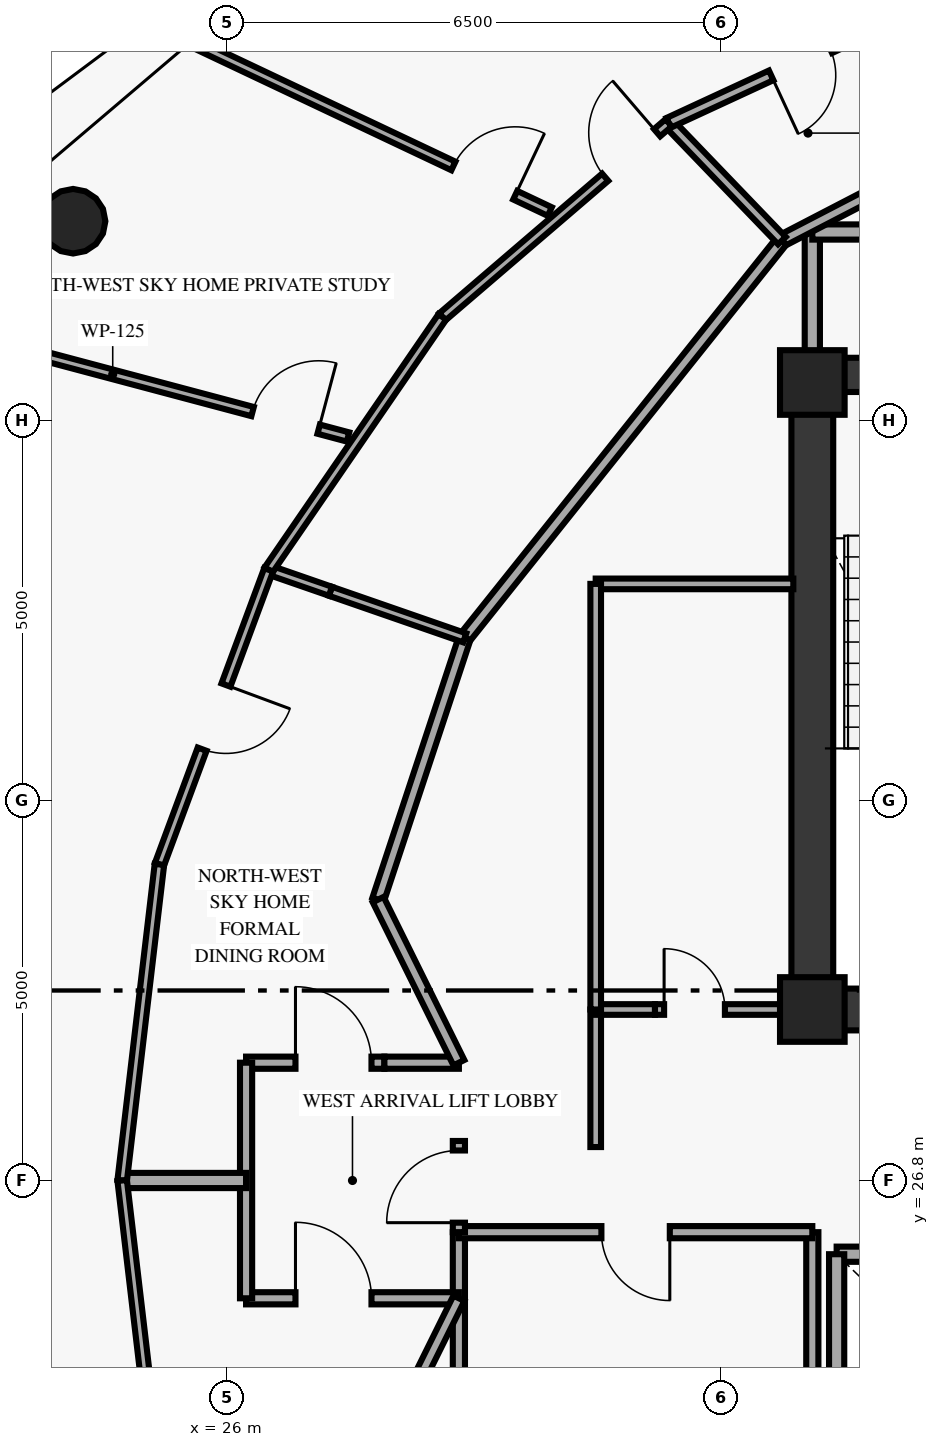
"""IFC4 building model, lengths in metres.
Left out: names, types, materials, properties, quantities, classifications, styles, units other than length and angle.
Written with IfcOpenShell. Run it as: python <this file> out.ifc"""

import sys

from ifc_helpers import new_model, si_unit, direction, frame, frame_2d, origin, origin_2d, place, context, subcontext, project, spatial, rectangle, circle, extrude, element, fill, save


model = new_model("IFC4")
c1 = context("Model", 3, precision=1e-05, world=origin(), true_north=direction((0.0, 1.0)))
c2 = subcontext(c1, "Body", "Model", "MODEL_VIEW")
j1 = project(units=[si_unit("LENGTHUNIT", "METRE"), si_unit("PLANEANGLEUNIT", "RADIAN")], contexts=[c1])
p1 = place(None, origin())
s1 = spatial("IfcSite", under=j1, at=p1, CompositionType="ELEMENT")
p2 = place(p1, origin())
s2 = spatial("IfcBuilding", under=s1, at=p2, CompositionType="ELEMENT")
p3 = place(p2, frame((0.0, 0.0, 251.95)))
s3 = spatial("IfcBuildingStorey", under=s2, at=p3, CompositionType="ELEMENT", Elevation=251.95)
for number, where, z_axis, x_axis in (
    (1, (33.7, 37.3, 0.0), (0.0, 0.0, 1.0), (1.0, 0.0, 0.0)),
    (2, (33.7, 29.05, 0.0), (0.0, 0.0, 1.0), (1.0, 0.0, 0.0)),
):
    element("IfcColumn", number, at=place(p3, frame(where, z_axis=z_axis, x_axis=x_axis)), inside=s3, PredefinedType="PILASTER", context=c2, shape_type="SweptSolid", body=[
        extrude(rectangle(XDim=0.85, YDim=0.85, at=origin_2d()), origin(), (0.0, 0.0, 1.0), 3.39),
    ])
p4 = place(p3, frame((23.974, 39.422, 0.0), z_axis=(0.0, 0.0, 1.0), x_axis=(1.0, 0.0, 0.0)))
e3 = element("IfcColumn", 3, at=p4, inside=s3, PredefinedType="COLUMN", context=c2, shape_type="SweptSolid", body=[
    extrude(circle(Radius=0.425, at=origin_2d()), origin(), (0.0, 0.0, 1.0), 3.39),
])
p5 = place(p3, frame((33.7, 29.05, 0.0), z_axis=(0.0, 0.0, 1.0), x_axis=(0.0, 1.0, 0.0)))
e4 = element("IfcWall", 4, at=p5, inside=s3, PredefinedType="SHEAR", context=c2, shape_type="SweptSolid", body=[
    extrude(rectangle(XDim=8.35, YDim=0.55, at=frame_2d((4.175, 0.0))), origin(), (0.0, 0.0, 1.0), 3.39),
])
p6 = place(p3, frame((33.7, 29.05, 0.0), z_axis=(0.0, 0.0, 1.0), x_axis=(1.0, 0.0, 0.0)))
e5 = element("IfcWall", 5, at=p6, inside=s3, PredefinedType="SHEAR", context=c2, shape_type="SweptSolid", body=[
    extrude(rectangle(XDim=10.6, YDim=0.55, at=frame_2d((5.3, 0.0))), origin(), (0.0, 0.0, 1.0), 3.39),
])
p7 = place(p3, frame((37.35, 37.4, 0.0), z_axis=(0.0, 0.0, 1.0), x_axis=(-1.0, 0.0, 0.0)))
e6 = element("IfcWall", 6, at=p7, inside=s3, PredefinedType="SHEAR", context=c2, shape_type="SweptSolid", body=[
    extrude(rectangle(XDim=3.65, YDim=0.45, at=frame_2d((1.825, 0.0))), origin(), (0.0, 0.0, 1.0), 3.39),
])
p8 = place(p7, frame((1.25, 0.0, 0.0)))
e7 = element("IfcOpeningElement", 7, at=p8, cuts=e6, PredefinedType="OPENING", context=c2, shape_type="SweptSolid", body=[
    extrude(rectangle(XDim=1.15, YDim=2.15, at=frame_2d((0.575, 1.075))), frame((0.0, 0.235, 0.0), z_axis=(0.0, -1.0, 0.0), x_axis=(1.0, 0.0, 0.0)), (0.0, 0.0, 1.0), 0.47),
])
p9 = place(p3, frame((33.7, 37.4, 0.0), z_axis=(0.0, 0.0, 1.0), x_axis=(0.0, 1.0, 0.0)))
e8 = element("IfcWall", 8, at=p9, inside=s3, PredefinedType="SOLIDWALL", context=c2, shape_type="SweptSolid", body=[
    extrude(rectangle(XDim=1.88, YDim=0.2, at=frame_2d((0.94, 0.0))), origin(), (0.0, 0.0, 1.0), 3.39),
])
p10 = place(p3, frame((38.9, 39.28, 0.0), z_axis=(0.0, 0.0, 1.0), x_axis=(-1.0, 0.0, 0.0)))
e9 = element("IfcWall", 9, at=p10, inside=s3, PredefinedType="SOLIDWALL", context=c2, shape_type="SweptSolid", body=[
    extrude(rectangle(XDim=5.2, YDim=0.2, at=frame_2d((2.6, 0.0))), origin(), (0.0, 0.0, 1.0), 3.39),
])
p11 = place(p10, frame((1.816, 0.0, 0.0)))
e10 = element("IfcOpeningElement", 10, at=p11, cuts=e9, PredefinedType="OPENING", context=c2, shape_type="SweptSolid", body=[
    extrude(rectangle(XDim=1.0, YDim=2.02, at=frame_2d((0.5, 1.01))), frame((0.0, 0.11, 0.0), z_axis=(0.0, -1.0, 0.0), x_axis=(1.0, 0.0, 0.0)), (0.0, 0.0, 1.0), 0.22),
])
p12 = place(p3, frame((34.02, 25.83, 0.0), z_axis=(0.0, 0.0, 1.0), x_axis=(1.0, 0.0, 0.0)))
e11 = element("IfcWall", 11, at=p12, inside=s3, PredefinedType="SOLIDWALL", context=c2, shape_type="SweptSolid", body=[
    extrude(rectangle(XDim=2.5, YDim=0.2, at=frame_2d((1.25, 0.0))), origin(), (0.0, 0.0, 1.0), 3.39),
])
p13 = place(p3, frame((34.02, 23.42, 0.0), z_axis=(0.0, 0.0, 1.0), x_axis=(0.0, 1.0, 0.0)))
e12 = element("IfcWall", 12, at=p13, inside=s3, PredefinedType="SOLIDWALL", context=c2, shape_type="SweptSolid", body=[
    extrude(rectangle(XDim=2.41, YDim=0.2, at=frame_2d((1.205, 0.0))), origin(), (0.0, 0.0, 1.0), 3.39),
])
p14 = place(p3, frame((29.05, 19.05, 0.0), z_axis=(0.0, 0.0, 1.0), x_axis=(0.0, 1.0, 0.0)))
e13 = element("IfcWall", 13, at=p14, inside=s3, PredefinedType="PARTITIONING", context=c2, shape_type="SweptSolid", body=[
    extrude(rectangle(XDim=7.07, YDim=0.16, at=frame_2d((3.535, 0.0))), origin(), (0.0, 0.0, 1.0), 3.39),
])
p15 = place(p3, frame((33.7, 23.45, 0.0), z_axis=(0.0, 0.0, 1.0), x_axis=(0.0, 1.0, 0.0)))
e14 = element("IfcWall", 14, at=p15, inside=s3, PredefinedType="PARTITIONING", context=c2, shape_type="SweptSolid", body=[
    extrude(rectangle(XDim=2.67, YDim=0.16, at=frame_2d((1.335, 0.0))), origin(), (0.0, 0.0, 1.0), 2.775),
])
p16 = place(p3, frame((33.7, 26.12, 0.0), z_axis=(0.0, 0.0, 1.0), x_axis=(-1.0, 0.0, 0.0)))
e15 = element("IfcWall", 15, at=p16, inside=s3, PredefinedType="PARTITIONING", context=c2, shape_type="SweptSolid", body=[
    extrude(rectangle(XDim=4.65, YDim=0.16, at=frame_2d((2.325, 0.0))), origin(), (0.0, 0.0, 1.0), 3.39),
])
p17 = place(p16, frame((1.875, 0.0, 0.0)))
e16 = element("IfcOpeningElement", 16, at=p17, cuts=e15, PredefinedType="OPENING", context=c2, shape_type="SweptSolid", body=[
    extrude(rectangle(XDim=0.9, YDim=2.02, at=frame_2d((0.45, 1.01))), frame((0.0, 0.09, 0.0), z_axis=(0.0, -1.0, 0.0), x_axis=(1.0, 0.0, 0.0)), (0.0, 0.0, 1.0), 0.18),
])
p18 = place(p3, frame((29.05, 26.12, 0.0), z_axis=(0.0, 0.0, 1.0), x_axis=(0.0, 1.0, 0.0)))
e17 = element("IfcWall", 17, at=p18, inside=s3, PredefinedType="PARTITIONING", context=c2, shape_type="SweptSolid", body=[
    extrude(rectangle(XDim=1.2, YDim=0.16, at=frame_2d((0.6, 0.0))), origin(), (0.0, 0.0, 1.0), 3.39),
])
p19 = place(p18, frame((0.125, 0.0, 0.0)))
e18 = element("IfcOpeningElement", 18, at=p19, cuts=e17, PredefinedType="OPENING", context=c2, shape_type="SweptSolid", body=[
    extrude(rectangle(XDim=0.95, YDim=2.15, at=frame_2d((0.475, 1.075))), frame((0.0, 0.09, 0.0), z_axis=(0.0, -1.0, 0.0), x_axis=(1.0, 0.0, 0.0)), (0.0, 0.0, 1.0), 0.18),
])
p20 = place(p3, frame((30.85, 27.24, 0.0), z_axis=(0.0, 0.0, 1.0), x_axis=(0.0, 1.0, 0.0)))
e19 = element("IfcWall", 19, at=p20, inside=s3, PredefinedType="PARTITIONING", context=c2, shape_type="SweptSolid", body=[
    extrude(rectangle(XDim=1.81, YDim=0.14, at=frame_2d((0.905, 0.0))), origin(), (0.0, 0.0, 1.0), 3.39),
])
p21 = place(p3, frame((30.85, 29.05, 0.0), z_axis=(0.0, 0.0, 1.0), x_axis=(1.0, 0.0, 0.0)))
e20 = element("IfcWall", 20, at=p21, inside=s3, PredefinedType="PARTITIONING", context=c2, shape_type="SweptSolid", body=[
    extrude(rectangle(XDim=0.78, YDim=0.14, at=frame_2d((0.39, 0.0))), origin(), (0.0, 0.0, 1.0), 3.39),
])
p22 = place(p3, frame((31.63, 29.05, 0.0), z_axis=(0.0, 0.0, 1.0), x_axis=(1.0, 0.0, 0.0)))
e21 = element("IfcWall", 21, at=p22, inside=s3, PredefinedType="PARTITIONING", context=c2, shape_type="SweptSolid", body=[
    extrude(rectangle(XDim=1.82, YDim=0.14, at=frame_2d((0.91, 0.0))), origin(), (0.0, 0.0, 1.0), 2.53),
])
p23 = place(p22, frame((0.12, 0.0, 0.0)))
e22 = element("IfcOpeningElement", 22, at=p23, cuts=e21, PredefinedType="OPENING", context=c2, shape_type="SweptSolid", body=[
    extrude(rectangle(XDim=0.8, YDim=2.05, at=frame_2d((0.4, 1.025))), frame((0.0, 0.08, 0.0), z_axis=(0.0, -1.0, 0.0), x_axis=(1.0, 0.0, 0.0)), (0.0, 0.0, 1.0), 0.16),
])
p24 = place(p3, frame((30.85, 34.65, 0.0), z_axis=(0.0, 0.0, 1.0), x_axis=(1.0, 0.0, 0.0)))
e23 = element("IfcWall", 23, at=p24, inside=s3, PredefinedType="PARTITIONING", context=c2, shape_type="SweptSolid", body=[
    extrude(rectangle(XDim=2.6, YDim=0.14, at=frame_2d((1.3, 0.0))), origin(), (0.0, 0.0, 1.0), 3.39),
])
p25 = place(p3, frame((30.85, 29.05, 0.0), z_axis=(0.0, 0.0, 1.0), x_axis=(0.0, 1.0, 0.0)))
e24 = element("IfcWall", 24, at=p25, inside=s3, PredefinedType="PARTITIONING", context=c2, shape_type="SweptSolid", body=[
    extrude(rectangle(XDim=5.6, YDim=0.14, at=frame_2d((2.8, 0.0))), origin(), (0.0, 0.0, 1.0), 3.39),
])
p26 = place(p3, frame((36.049, 40.593, 0.0), z_axis=(0.0, 0.0, 1.0), x_axis=(-0.887674575788, -0.460471331898, 0.0)))
e25 = element("IfcWall", 25, at=p26, inside=s3, PredefinedType="PARTITIONING", context=c2, shape_type="SweptSolid", body=[
    extrude(rectangle(XDim=3.097, YDim=0.16, at=frame_2d((1.548, 0.0))), origin(), (0.0, 0.0, 1.0), 3.39),
])
p27 = place(p3, frame((33.3, 39.167, 0.0), z_axis=(0.0, 0.0, 1.0), x_axis=(-0.623915746766, -0.781491612839, 0.0)))
e26 = element("IfcWall", 26, at=p27, inside=s3, PredefinedType="PARTITIONING", context=c2, shape_type="SweptSolid", body=[
    extrude(rectangle(XDim=6.688, YDim=0.16, at=frame_2d((3.344, 0.0))), origin(), (0.0, 0.0, 1.0), 3.39),
])
p28 = place(p3, frame((29.127, 33.94, 0.0), z_axis=(0.0, 0.0, 1.0), x_axis=(-0.313985571683, -0.949427754374, 0.0)))
e27 = element("IfcWall", 27, at=p28, inside=s3, PredefinedType="PARTITIONING", context=c2, shape_type="SweptSolid", body=[
    extrude(rectangle(XDim=3.627, YDim=0.16, at=frame_2d((1.813, 0.0))), origin(), (0.0, 0.0, 1.0), 3.39),
])
p29 = place(p3, frame((26.25, 28.35, 0.0), z_axis=(0.0, 0.0, 1.0), x_axis=(1.0, 0.0, 0.0)))
e28 = element("IfcWall", 28, at=p29, inside=s3, PredefinedType="PARTITIONING", context=c2, shape_type="SweptSolid", body=[
    extrude(rectangle(XDim=1.82, YDim=0.16, at=frame_2d((0.91, 0.0))), origin(), (0.0, 0.0, 1.0), 3.39),
])
p30 = place(p29, frame((0.65, 0.0, 0.0)))
e29 = element("IfcOpeningElement", 29, at=p30, cuts=e28, PredefinedType="OPENING", context=c2, shape_type="SweptSolid", body=[
    extrude(rectangle(XDim=1.0, YDim=2.02, at=frame_2d((0.5, 1.01))), frame((0.0, 0.09, 0.0), z_axis=(0.0, -1.0, 0.0), x_axis=(1.0, 0.0, 0.0)), (0.0, 0.0, 1.0), 0.18),
])
p31 = place(p3, frame((28.07, 28.35, 0.0), z_axis=(0.0, 0.0, 1.0), x_axis=(1.0, 0.0, 0.0)))
e30 = element("IfcWall", 30, at=p31, inside=s3, PredefinedType="PARTITIONING", context=c2, shape_type="SweptSolid", body=[
    extrude(rectangle(XDim=0.98, YDim=0.16, at=frame_2d((0.49, 0.0))), origin(), (0.0, 0.0, 1.0), 2.53),
])
p32 = place(p3, frame((26.25, 25.25, 0.0), z_axis=(0.0, 0.0, 1.0), x_axis=(1.0, 0.0, 0.0)))
e31 = element("IfcWall", 31, at=p32, inside=s3, PredefinedType="PARTITIONING", context=c2, shape_type="SweptSolid", body=[
    extrude(rectangle(XDim=2.8, YDim=0.16, at=frame_2d((1.4, 0.0))), origin(), (0.0, 0.0, 1.0), 3.39),
])
p33 = place(p32, frame((0.65, 0.0, 0.0)))
e32 = element("IfcOpeningElement", 32, at=p33, cuts=e31, PredefinedType="OPENING", context=c2, shape_type="SweptSolid", body=[
    extrude(rectangle(XDim=1.0, YDim=2.02, at=frame_2d((0.5, 1.01))), frame((0.0, 0.09, 0.0), z_axis=(0.0, -1.0, 0.0), x_axis=(1.0, 0.0, 0.0)), (0.0, 0.0, 1.0), 0.18),
])
p34 = place(p3, frame((26.25, 25.25, 0.0), z_axis=(0.0, 0.0, 1.0), x_axis=(0.0, 1.0, 0.0)))
e33 = element("IfcWall", 33, at=p34, inside=s3, PredefinedType="PARTITIONING", context=c2, shape_type="SweptSolid", body=[
    extrude(rectangle(XDim=3.1, YDim=0.16, at=frame_2d((1.55, 0.0))), origin(), (0.0, 0.0, 1.0), 3.39),
])
for number, where, z_axis, x_axis in (
    (34, (27.988, 30.496, 0.0), (0.0, 0.0, 1.0), (0.444, -0.896, 0.0)),
    (35, (27.988, 23.104, 0.0), (0.0, 0.0, 1.0), (0.444, 0.896, 0.0)),
):
    element("IfcWall", number, at=place(p3, frame(where, z_axis=z_axis, x_axis=x_axis)), inside=s3, PredefinedType="PARTITIONING", context=c2, shape_type="SweptSolid", body=[
        extrude(rectangle(XDim=2.394, YDim=0.16, at=frame_2d((1.197, 0.0))), origin(), (0.0, 0.0, 1.0), 3.39),
    ])
p35 = place(p3, frame((26.25, 26.8, 0.0), z_axis=(0.0, 0.0, 1.0), x_axis=(-1.0, 0.0, 0.0)))
e36 = element("IfcWall", 36, at=p35, inside=s3, PredefinedType="PARTITIONING", context=c2, shape_type="SweptSolid", body=[
    extrude(rectangle(XDim=1.63, YDim=0.2, at=frame_2d((0.815, 0.0))), origin(), (0.0, 0.0, 1.0), 3.39),
])
p36 = place(p3, frame((33.3, 39.167, 0.0), z_axis=(0.0, 0.0, 1.0), x_axis=(-0.693002052722, 0.720935610803, 0.0)))
e37 = element("IfcWall", 37, at=p36, inside=s3, PredefinedType="PARTITIONING", context=c2, shape_type="SweptSolid", body=[
    extrude(rectangle(XDim=2.15, YDim=0.14, at=frame_2d((1.075, 0.0))), origin(), (0.0, 0.0, 1.0), 3.39),
])
p37 = place(p3, frame((29.127, 33.94, 0.0), z_axis=(0.0, 0.0, 1.0), x_axis=(-0.944748361613, 0.327796481416, 0.0)))
e38 = element("IfcWall", 38, at=p37, inside=s3, PredefinedType="PARTITIONING", context=c2, shape_type="SweptSolid", body=[
    extrude(rectangle(XDim=1.87, YDim=0.125, at=frame_2d((0.935, 0.0))), origin(), (0.0, 0.0, 1.0), 3.39),
])
p38 = place(p3, frame((27.36, 34.553, 0.0), z_axis=(0.0, 0.0, 1.0), x_axis=(-0.944783504011, 0.327695179319, 0.0)))
e39 = element("IfcWall", 39, at=p38, inside=s3, PredefinedType="PARTITIONING", context=c2, shape_type="SweptSolid", body=[
    extrude(rectangle(XDim=0.861, YDim=0.125, at=frame_2d((0.43, 0.0))), origin(), (0.0, 0.0, 1.0), 2.19),
])
p39 = place(p3, frame((31.81, 40.717, 0.0), z_axis=(0.0, 0.0, 1.0), x_axis=(0.907525084777, 0.419997881543, 0.0)))
e40 = element("IfcWall", 40, at=p39, inside=s3, PredefinedType="PARTITIONING", context=c2, shape_type="SweptSolid", body=[
    extrude(rectangle(XDim=3.821, YDim=0.14, at=frame_2d((1.911, 0.0))), origin(), (0.0, 0.0, 1.0), 3.39),
])
p40 = place(p39, frame((1.486, 0.0, 0.0)))
e41 = element("IfcOpeningElement", 41, at=p40, cuts=e40, PredefinedType="OPENING", context=c2, shape_type="SweptSolid", body=[
    extrude(rectangle(XDim=0.85, YDim=2.02, at=frame_2d((0.425, 1.01))), frame((0.0, 0.08, 0.0), z_axis=(0.0, -1.0, 0.0), x_axis=(1.0, 0.0, 0.0)), (0.0, 0.0, 1.0), 0.16),
])
p41 = place(p3, frame((28.832, 38.163, 0.0), z_axis=(0.0, 0.0, 1.0), x_axis=(0.759085259689, 0.650991220004, 0.0)))
e42 = element("IfcWall", 42, at=p41, inside=s3, PredefinedType="PARTITIONING", context=c2, shape_type="SweptSolid", body=[
    extrude(rectangle(XDim=3.923, YDim=0.125, at=frame_2d((1.961, 0.0))), origin(), (0.0, 0.0, 1.0), 3.39),
])
p42 = place(p41, frame((2.823, 0.0, 0.0)))
e43 = element("IfcOpeningElement", 43, at=p42, cuts=e42, PredefinedType="OPENING", context=c2, shape_type="SweptSolid", body=[
    extrude(rectangle(XDim=0.9, YDim=2.02, at=frame_2d((0.45, 1.01))), frame((0.0, 0.073, 0.0), z_axis=(0.0, -1.0, 0.0), x_axis=(1.0, 0.0, 0.0)), (0.0, 0.0, 1.0), 0.145),
])
p43 = place(p3, frame((28.832, 38.163, 0.0), z_axis=(0.0, 0.0, 1.0), x_axis=(-0.565994846929, -0.824408778004, 0.0)))
e44 = element("IfcWall", 44, at=p43, inside=s3, PredefinedType="PARTITIONING", context=c2, shape_type="SweptSolid", body=[
    extrude(rectangle(XDim=4.037, YDim=0.125, at=frame_2d((2.019, 0.0))), origin(), (0.0, 0.0, 1.0), 3.39),
])
p44 = place(p3, frame((25.11, 30.959, 0.0), z_axis=(0.0, 0.0, 1.0), x_axis=(0.347625950087, 0.937633296564, 0.0)))
e45 = element("IfcWall", 45, at=p44, inside=s3, PredefinedType="PARTITIONING", context=c2, shape_type="SweptSolid", body=[
    extrude(rectangle(XDim=4.134, YDim=0.125, at=frame_2d((2.067, 0.0))), origin(), (0.0, 0.0, 1.0), 3.39),
])
p45 = place(p44, frame((1.617, 0.0, 0.0)))
e46 = element("IfcOpeningElement", 46, at=p45, cuts=e45, PredefinedType="OPENING", context=c2, shape_type="SweptSolid", body=[
    extrude(rectangle(XDim=0.9, YDim=2.02, at=frame_2d((0.45, 1.01))), frame((0.0, 0.073, 0.0), z_axis=(0.0, -1.0, 0.0), x_axis=(1.0, 0.0, 0.0)), (0.0, 0.0, 1.0), 0.145),
])
for number, where, z_axis, x_axis in (
    (47, (25.11, 30.959, 0.0), (0.0, 0.0, 1.0), (-0.117, -0.993, 0.0)),
    (48, (24.62, 26.8, 0.0), (0.0, 0.0, 1.0), (0.117, -0.993, 0.0)),
):
    element("IfcWall", number, at=place(p3, frame(where, z_axis=z_axis, x_axis=x_axis)), inside=s3, PredefinedType="PARTITIONING", context=c2, shape_type="SweptSolid", body=[
        extrude(rectangle(XDim=4.188, YDim=0.125, at=frame_2d((2.094, 0.0))), origin(), (0.0, 0.0, 1.0), 3.39),
    ])
p46 = place(p3, frame((30.246, 39.549, 0.0), z_axis=(0.0, 0.0, 1.0), x_axis=(-0.903897878918, 0.427748319094, 0.0)))
e49 = element("IfcWall", 49, at=p46, inside=s3, PredefinedType="PARTITIONING", context=c2, shape_type="SweptSolid", body=[
    extrude(rectangle(XDim=5.185, YDim=0.125, at=frame_2d((2.593, 0.0))), origin(), (0.0, 0.0, 1.0), 3.39),
])
p47 = place(p46, frame((0.503, 0.0, 0.0)))
e50 = element("IfcOpeningElement", 50, at=p47, cuts=e49, PredefinedType="OPENING", context=c2, shape_type="SweptSolid", body=[
    extrude(rectangle(XDim=0.9, YDim=2.02, at=frame_2d((0.45, 1.01))), frame((0.0, 0.073, 0.0), z_axis=(0.0, -1.0, 0.0), x_axis=(1.0, 0.0, 0.0)), (0.0, 0.0, 1.0), 0.145),
])
p48 = place(p3, frame((27.592, 36.583, 0.0), z_axis=(0.0, 0.0, 1.0), x_axis=(-0.966372641244, 0.257145714053, 0.0)))
e51 = element("IfcWall", 51, at=p48, inside=s3, PredefinedType="PARTITIONING", context=c2, shape_type="SweptSolid", body=[
    extrude(rectangle(XDim=6.409, YDim=0.125, at=frame_2d((3.204, 0.0))), origin(), (0.0, 0.0, 1.0), 3.39),
])
p49 = place(p48, frame((0.4, 0.0, 0.0)))
e52 = element("IfcOpeningElement", 52, at=p49, cuts=e51, PredefinedType="OPENING", context=c2, shape_type="SweptSolid", body=[
    extrude(rectangle(XDim=0.9, YDim=2.02, at=frame_2d((0.45, 1.01))), frame((0.0, 0.073, 0.0), z_axis=(0.0, -1.0, 0.0), x_axis=(1.0, 0.0, 0.0)), (0.0, 0.0, 1.0), 0.145),
])
p50 = place(p17, origin())
e53 = element("IfcDoor", 53, at=p50, inside=s3, OperationType="SINGLE_SWING_LEFT", PredefinedType="DOOR", context=c2, shape_type="SweptSolid", body=[
    extrude(rectangle(XDim=0.9, YDim=2.02, at=frame_2d((0.45, 1.01))), frame((0.0, 0.025, 0.0), z_axis=(0.0, -1.0, 0.0), x_axis=(1.0, 0.0, 0.0)), (0.0, 0.0, 1.0), 0.05),
])
fill(e16, e53)
p51 = place(p19, origin())
e54 = element("IfcDoor", 54, at=p51, inside=s3, OperationType="SINGLE_SWING_RIGHT", PredefinedType="DOOR", context=c2, shape_type="SweptSolid", body=[
    extrude(rectangle(XDim=0.95, YDim=2.15, at=frame_2d((0.475, 1.075))), frame((0.0, 0.025, 0.0), z_axis=(0.0, -1.0, 0.0), x_axis=(1.0, 0.0, 0.0)), (0.0, 0.0, 1.0), 0.05),
])
fill(e18, e54)
p52 = place(p23, origin())
e55 = element("IfcDoor", 55, at=p52, inside=s3, OperationType="SINGLE_SWING_LEFT", PredefinedType="DOOR", context=c2, shape_type="SweptSolid", body=[
    extrude(rectangle(XDim=0.8, YDim=2.05, at=frame_2d((0.4, 1.025))), frame((0.0, 0.025, 0.0), z_axis=(0.0, -1.0, 0.0), x_axis=(1.0, 0.0, 0.0)), (0.0, 0.0, 1.0), 0.05),
])
fill(e22, e55)
p53 = place(p30, origin())
e56 = element("IfcDoor", 56, at=p53, inside=s3, OperationType="SINGLE_SWING_LEFT", PredefinedType="DOOR", context=c2, shape_type="SweptSolid", body=[
    extrude(rectangle(XDim=1.0, YDim=2.02, at=frame_2d((0.5, 1.01))), frame((0.0, 0.025, 0.0), z_axis=(0.0, -1.0, 0.0), x_axis=(1.0, 0.0, 0.0)), (0.0, 0.0, 1.0), 0.05),
])
fill(e29, e56)
p54 = place(p33, origin())
e57 = element("IfcDoor", 57, at=p54, inside=s3, OperationType="SINGLE_SWING_LEFT", PredefinedType="DOOR", context=c2, shape_type="SweptSolid", body=[
    extrude(rectangle(XDim=1.0, YDim=2.02, at=frame_2d((0.5, 1.01))), frame((0.0, 0.025, 0.0), z_axis=(0.0, -1.0, 0.0), x_axis=(1.0, 0.0, 0.0)), (0.0, 0.0, 1.0), 0.05),
])
fill(e32, e57)
p55 = place(p40, origin())
e58 = element("IfcDoor", 58, at=p55, inside=s3, OperationType="SINGLE_SWING_LEFT", PredefinedType="DOOR", context=c2, shape_type="SweptSolid", body=[
    extrude(rectangle(XDim=0.85, YDim=2.02, at=frame_2d((0.425, 1.01))), frame((0.0, 0.025, 0.0), z_axis=(0.0, -1.0, 0.0), x_axis=(1.0, 0.0, 0.0)), (0.0, 0.0, 1.0), 0.05),
])
fill(e41, e58)
p56 = place(p42, origin())
e59 = element("IfcDoor", 59, at=p56, inside=s3, OperationType="SINGLE_SWING_RIGHT", PredefinedType="DOOR", context=c2, shape_type="SweptSolid", body=[
    extrude(rectangle(XDim=0.9, YDim=2.02, at=frame_2d((0.45, 1.01))), frame((0.0, 0.025, 0.0), z_axis=(0.0, -1.0, 0.0), x_axis=(1.0, 0.0, 0.0)), (0.0, 0.0, 1.0), 0.05),
])
fill(e43, e59)
p57 = place(p45, origin())
e60 = element("IfcDoor", 60, at=p57, inside=s3, OperationType="SINGLE_SWING_RIGHT", PredefinedType="DOOR", context=c2, shape_type="SweptSolid", body=[
    extrude(rectangle(XDim=0.9, YDim=2.02, at=frame_2d((0.45, 1.01))), frame((0.0, 0.025, 0.0), z_axis=(0.0, -1.0, 0.0), x_axis=(1.0, 0.0, 0.0)), (0.0, 0.0, 1.0), 0.05),
])
fill(e46, e60)
p58 = place(p47, origin())
e61 = element("IfcDoor", 61, at=p58, inside=s3, OperationType="SINGLE_SWING_LEFT", PredefinedType="DOOR", context=c2, shape_type="SweptSolid", body=[
    extrude(rectangle(XDim=0.9, YDim=2.02, at=frame_2d((0.45, 1.01))), frame((0.0, 0.025, 0.0), z_axis=(0.0, -1.0, 0.0), x_axis=(1.0, 0.0, 0.0)), (0.0, 0.0, 1.0), 0.05),
])
fill(e50, e61)
p59 = place(p49, origin())
e62 = element("IfcDoor", 62, at=p59, inside=s3, OperationType="SINGLE_SWING_LEFT", PredefinedType="DOOR", context=c2, shape_type="SweptSolid", body=[
    extrude(rectangle(XDim=0.9, YDim=2.02, at=frame_2d((0.45, 1.01))), frame((0.0, 0.025, 0.0), z_axis=(0.0, -1.0, 0.0), x_axis=(1.0, 0.0, 0.0)), (0.0, 0.0, 1.0), 0.05),
])
fill(e52, e62)
save(model, sys.argv[1])
